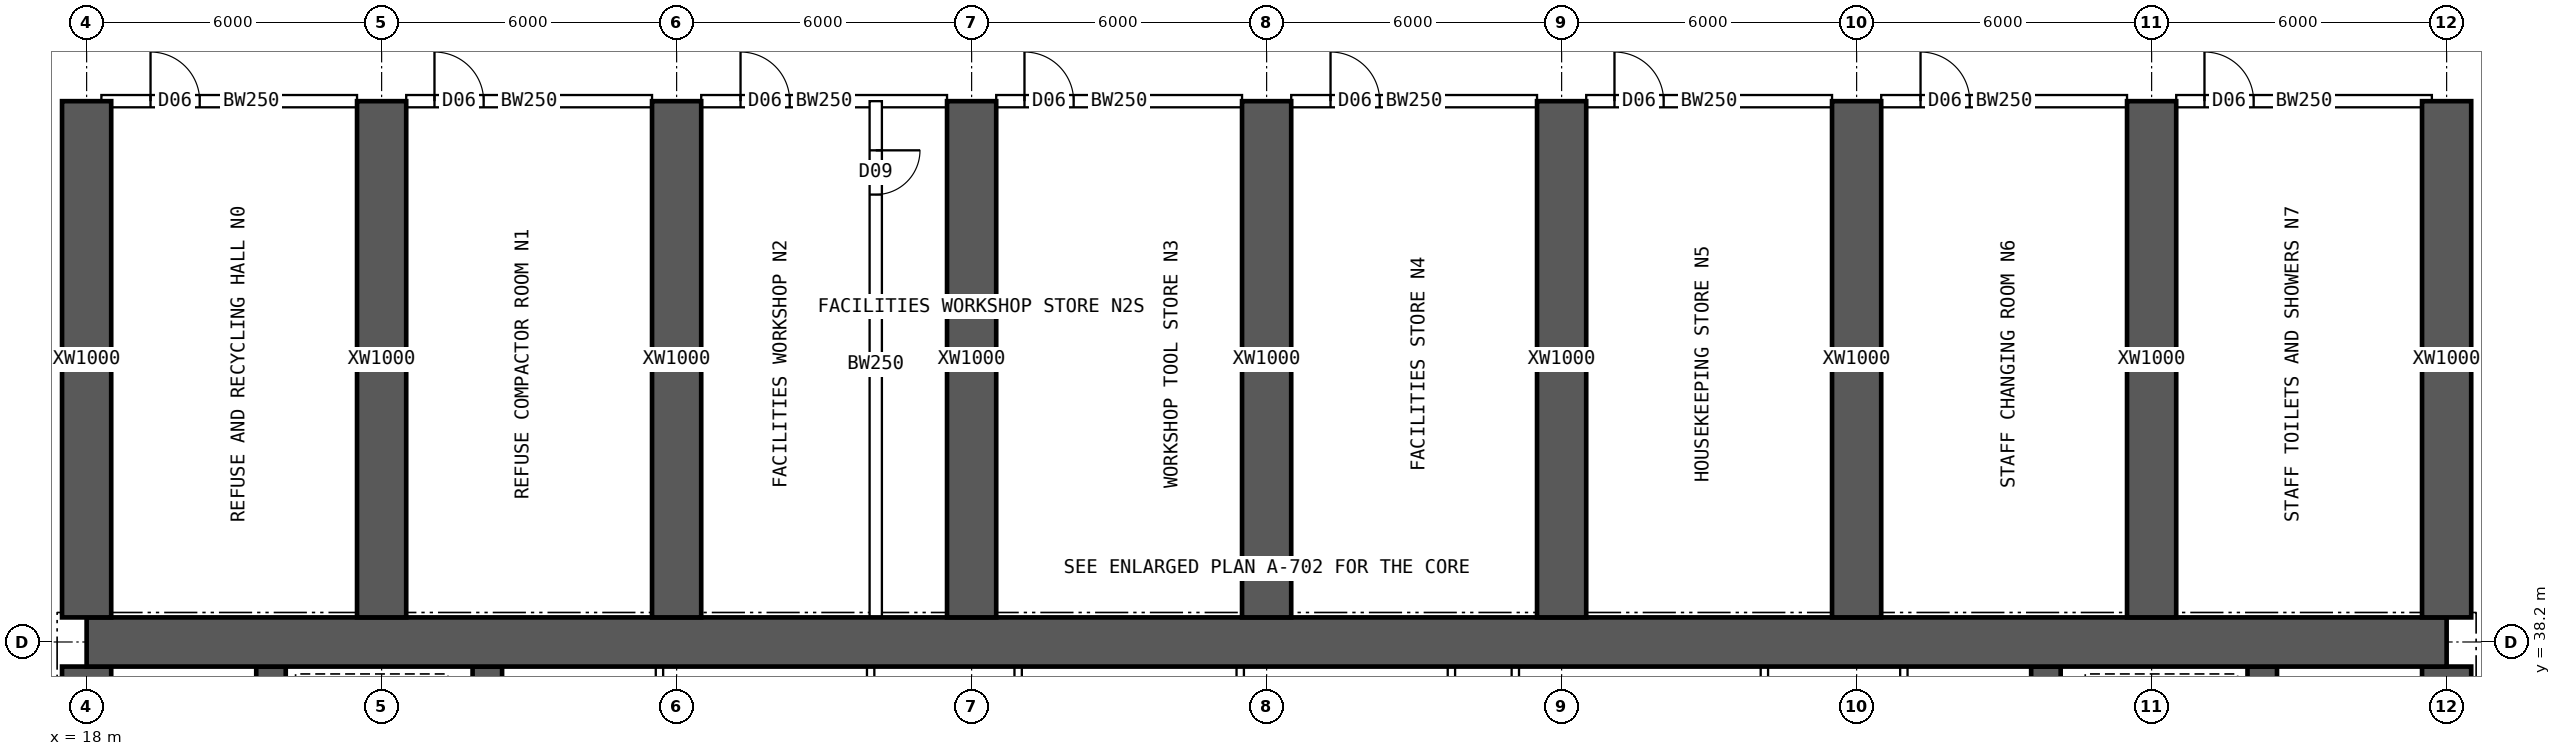
"""IFC4 building model, lengths in metres.
Left out: names, types, materials, properties, quantities, classifications, styles, units other than length and angle.
Written with IfcOpenShell. Run it as: python <this file> out.ifc"""

import sys

from ifc_helpers import new_model, si_unit, direction, frame, frame_2d, origin, place, context, subcontext, project, spatial, rectangle, extrude, element, fill, save


model = new_model("IFC4")
c1 = context("Model", 3, precision=1e-05, world=origin(), true_north=direction((0.0, 1.0)))
c2 = subcontext(c1, "Body", "Model", "MODEL_VIEW")
j1 = project(units=[si_unit("LENGTHUNIT", "METRE"), si_unit("PLANEANGLEUNIT", "RADIAN")], contexts=[c1])
p1 = place(None, origin())
s1 = spatial("IfcSite", under=j1, at=p1, CompositionType="ELEMENT")
p2 = place(p1, origin())
s2 = spatial("IfcBuilding", under=s1, at=p2, CompositionType="ELEMENT")
p3 = place(p2, frame((0.0, 0.0, -4.5)))
s3 = spatial("IfcBuildingStorey", under=s2, at=p3, CompositionType="ELEMENT", Elevation=-4.5)
p4 = place(p3, frame((18.0, 38.2, 0.0), z_axis=(0.0, 0.0, 1.0), x_axis=(1.0, 0.0, 0.0)))
e1 = element("IfcWall", 1, at=p4, inside=s3, PredefinedType="SHEAR", context=c2, shape_type="SweptSolid", body=[
    extrude(rectangle(XDim=48.0, YDim=1.0, at=frame_2d((24.0, 0.0))), origin(), (0.0, 0.0, 1.0), 4.5),
])
p5 = place(p3, frame((18.0, 26.3, 0.0), z_axis=(0.0, 0.0, 1.0), x_axis=(0.0, 1.0, 0.0)))
e2 = element("IfcWall", 2, at=p5, inside=s3, PredefinedType="SHEAR", context=c2, shape_type="SweptSolid", body=[
    extrude(rectangle(XDim=11.4, YDim=1.0, at=frame_2d((5.7, 0.0))), origin(), (0.0, 0.0, 1.0), 4.5),
])
p6 = place(p5, frame((5.0, 0.0, 0.0)))
e3 = element("IfcOpeningElement", 3, at=p6, cuts=e2, PredefinedType="OPENING", context=c2, shape_type="SweptSolid", body=[
    extrude(rectangle(XDim=1.2, YDim=2.1, at=frame_2d((0.6, 1.05))), frame((0.0, 0.51, 0.0), z_axis=(0.0, -1.0, 0.0), x_axis=(1.0, 0.0, 0.0)), (0.0, 0.0, 1.0), 1.02),
])
p7 = place(p3, frame((66.0, 26.3, 0.0), z_axis=(0.0, 0.0, 1.0), x_axis=(0.0, 1.0, 0.0)))
e4 = element("IfcWall", 4, at=p7, inside=s3, PredefinedType="SHEAR", context=c2, shape_type="SweptSolid", body=[
    extrude(rectangle(XDim=11.4, YDim=1.0, at=frame_2d((5.7, 0.0))), origin(), (0.0, 0.0, 1.0), 4.5),
])
p8 = place(p7, frame((5.0, 0.0, 0.0)))
e5 = element("IfcOpeningElement", 5, at=p8, cuts=e4, PredefinedType="OPENING", context=c2, shape_type="SweptSolid", body=[
    extrude(rectangle(XDim=1.2, YDim=2.1, at=frame_2d((0.6, 1.05))), frame((0.0, 0.51, 0.0), z_axis=(0.0, -1.0, 0.0), x_axis=(1.0, 0.0, 0.0)), (0.0, 0.0, 1.0), 1.02),
])
for number, where, z_axis, x_axis in (
    (6, (21.75, 34.75, 0.0), (0.0, 0.0, 1.0), (0.0, 1.0, 0.0)),
    (7, (62.25, 34.75, 0.0), (0.0, 0.0, 1.0), (0.0, 1.0, 0.0)),
    (8, (26.15, 34.75, 0.0), (0.0, 0.0, 1.0), (0.0, 1.0, 0.0)),
    (9, (57.85, 34.75, 0.0), (0.0, 0.0, 1.0), (0.0, 1.0, 0.0)),
):
    element("IfcWall", number, at=place(p3, frame(where, z_axis=z_axis, x_axis=x_axis)), inside=s3, PredefinedType="SHEAR", context=c2, shape_type="SweptSolid", body=[
        extrude(rectangle(XDim=2.95, YDim=0.6, at=frame_2d((1.475, 0.0))), origin(), (0.0, 0.0, 1.0), 4.5),
    ])
for number, where, z_axis, x_axis in (
    (10, (18.0, 38.7, 0.0), (0.0, 0.0, 1.0), (0.0, 1.0, 0.0)),
    (11, (24.0, 38.7, 0.0), (0.0, 0.0, 1.0), (0.0, 1.0, 0.0)),
    (12, (30.0, 38.7, 0.0), (0.0, 0.0, 1.0), (0.0, 1.0, 0.0)),
    (13, (36.0, 38.7, 0.0), (0.0, 0.0, 1.0), (0.0, 1.0, 0.0)),
    (14, (42.0, 38.7, 0.0), (0.0, 0.0, 1.0), (0.0, 1.0, 0.0)),
    (15, (48.0, 38.7, 0.0), (0.0, 0.0, 1.0), (0.0, 1.0, 0.0)),
    (16, (54.0, 38.7, 0.0), (0.0, 0.0, 1.0), (0.0, 1.0, 0.0)),
    (17, (60.0, 38.7, 0.0), (0.0, 0.0, 1.0), (0.0, 1.0, 0.0)),
    (18, (66.0, 38.7, 0.0), (0.0, 0.0, 1.0), (0.0, 1.0, 0.0)),
):
    element("IfcWall", number, at=place(p3, frame(where, z_axis=z_axis, x_axis=x_axis)), inside=s3, PredefinedType="SHEAR", context=c2, shape_type="SweptSolid", body=[
        extrude(rectangle(XDim=10.5, YDim=1.0, at=frame_2d((5.25, 0.0))), origin(), (0.0, 0.0, 1.0), 4.5),
    ])
for number, where, z_axis, x_axis in (
    (19, (29.651, 34.75, 0.0), (0.0, 0.0, 1.0), (0.0, 1.0, 0.0)),
    (20, (33.946, 34.75, 0.0), (0.0, 0.0, 1.0), (0.0, 1.0, 0.0)),
    (21, (36.946, 34.75, 0.0), (0.0, 0.0, 1.0), (0.0, 1.0, 0.0)),
    (22, (41.463, 34.75, 0.0), (0.0, 0.0, 1.0), (0.0, 1.0, 0.0)),
    (23, (45.758, 34.75, 0.0), (0.0, 0.0, 1.0), (0.0, 1.0, 0.0)),
    (24, (47.058, 34.75, 0.0), (0.0, 0.0, 1.0), (0.0, 1.0, 0.0)),
    (25, (52.124, 34.75, 0.0), (0.0, 0.0, 1.0), (0.0, 1.0, 0.0)),
    (26, (54.961, 34.75, 0.0), (0.0, 0.0, 1.0), (0.0, 1.0, 0.0)),
):
    element("IfcWall", number, at=place(p3, frame(where, z_axis=z_axis, x_axis=x_axis)), inside=s3, PredefinedType="SOLIDWALL", context=c2, shape_type="SweptSolid", body=[
        extrude(rectangle(XDim=2.95, YDim=0.15, at=frame_2d((1.475, 0.0))), origin(), (0.0, 0.0, 1.0), 4.15),
    ])
p9 = place(p3, frame((34.05, 38.5, 0.0), z_axis=(0.0, 0.0, 1.0), x_axis=(0.0, 1.0, 0.0)))
e27 = element("IfcWall", 27, at=p9, inside=s3, PredefinedType="SOLIDWALL", context=c2, shape_type="SweptSolid", body=[
    extrude(rectangle(XDim=10.7, YDim=0.25, at=frame_2d((5.35, 0.0))), origin(), (0.0, 0.0, 1.0), 4.15),
])
p10 = place(p9, frame((8.8, 0.0, 0.0)))
e28 = element("IfcOpeningElement", 28, at=p10, cuts=e27, PredefinedType="OPENING", context=c2, shape_type="SweptSolid", body=[
    extrude(rectangle(XDim=0.9, YDim=2.1, at=frame_2d((0.45, 1.05))), frame((0.0, 0.135, 0.0), z_axis=(0.0, -1.0, 0.0), x_axis=(1.0, 0.0, 0.0)), (0.0, 0.0, 1.0), 0.27),
])
p11 = place(p3, frame((18.3, 49.2, 0.0), z_axis=(0.0, 0.0, 1.0), x_axis=(1.0, 0.0, 0.0)))
e29 = element("IfcWall", 29, at=p11, inside=s3, PredefinedType="SOLIDWALL", context=c2, shape_type="SweptSolid", body=[
    extrude(rectangle(XDim=5.2, YDim=0.25, at=frame_2d((2.6, 0.0))), origin(), (0.0, 0.0, 1.0), 4.15),
])
p12 = place(p11, frame((1.0, 0.0, 0.0)))
e30 = element("IfcOpeningElement", 30, at=p12, cuts=e29, PredefinedType="OPENING", context=c2, shape_type="SweptSolid", body=[
    extrude(rectangle(XDim=1.0, YDim=2.1, at=frame_2d((0.5, 1.05))), frame((0.0, 0.135, 0.0), z_axis=(0.0, -1.0, 0.0), x_axis=(1.0, 0.0, 0.0)), (0.0, 0.0, 1.0), 0.27),
])
p13 = place(p3, frame((24.5, 49.2, 0.0), z_axis=(0.0, 0.0, 1.0), x_axis=(1.0, 0.0, 0.0)))
e31 = element("IfcWall", 31, at=p13, inside=s3, PredefinedType="SOLIDWALL", context=c2, shape_type="SweptSolid", body=[
    extrude(rectangle(XDim=5.0, YDim=0.25, at=frame_2d((2.5, 0.0))), origin(), (0.0, 0.0, 1.0), 4.15),
])
p14 = place(p13, frame((0.575, 0.0, 0.0)))
e32 = element("IfcOpeningElement", 32, at=p14, cuts=e31, PredefinedType="OPENING", context=c2, shape_type="SweptSolid", body=[
    extrude(rectangle(XDim=1.0, YDim=2.1, at=frame_2d((0.5, 1.05))), frame((0.0, 0.135, 0.0), z_axis=(0.0, -1.0, 0.0), x_axis=(1.0, 0.0, 0.0)), (0.0, 0.0, 1.0), 0.27),
])
p15 = place(p3, frame((30.5, 49.2, 0.0), z_axis=(0.0, 0.0, 1.0), x_axis=(1.0, 0.0, 0.0)))
e33 = element("IfcWall", 33, at=p15, inside=s3, PredefinedType="SOLIDWALL", context=c2, shape_type="SweptSolid", body=[
    extrude(rectangle(XDim=5.0, YDim=0.25, at=frame_2d((2.5, 0.0))), origin(), (0.0, 0.0, 1.0), 4.15),
])
p16 = place(p15, frame((0.8, 0.0, 0.0)))
e34 = element("IfcOpeningElement", 34, at=p16, cuts=e33, PredefinedType="OPENING", context=c2, shape_type="SweptSolid", body=[
    extrude(rectangle(XDim=1.0, YDim=2.1, at=frame_2d((0.5, 1.05))), frame((0.0, 0.135, 0.0), z_axis=(0.0, -1.0, 0.0), x_axis=(1.0, 0.0, 0.0)), (0.0, 0.0, 1.0), 0.27),
])
p17 = place(p3, frame((36.5, 49.2, 0.0), z_axis=(0.0, 0.0, 1.0), x_axis=(1.0, 0.0, 0.0)))
e35 = element("IfcWall", 35, at=p17, inside=s3, PredefinedType="SOLIDWALL", context=c2, shape_type="SweptSolid", body=[
    extrude(rectangle(XDim=5.0, YDim=0.25, at=frame_2d((2.5, 0.0))), origin(), (0.0, 0.0, 1.0), 4.15),
])
p18 = place(p17, frame((0.575, 0.0, 0.0)))
e36 = element("IfcOpeningElement", 36, at=p18, cuts=e35, PredefinedType="OPENING", context=c2, shape_type="SweptSolid", body=[
    extrude(rectangle(XDim=1.0, YDim=2.1, at=frame_2d((0.5, 1.05))), frame((0.0, 0.135, 0.0), z_axis=(0.0, -1.0, 0.0), x_axis=(1.0, 0.0, 0.0)), (0.0, 0.0, 1.0), 0.27),
])
p19 = place(p3, frame((42.5, 49.2, 0.0), z_axis=(0.0, 0.0, 1.0), x_axis=(1.0, 0.0, 0.0)))
e37 = element("IfcWall", 37, at=p19, inside=s3, PredefinedType="SOLIDWALL", context=c2, shape_type="SweptSolid", body=[
    extrude(rectangle(XDim=5.0, YDim=0.25, at=frame_2d((2.5, 0.0))), origin(), (0.0, 0.0, 1.0), 4.15),
])
p20 = place(p19, frame((0.8, 0.0, 0.0)))
e38 = element("IfcOpeningElement", 38, at=p20, cuts=e37, PredefinedType="OPENING", context=c2, shape_type="SweptSolid", body=[
    extrude(rectangle(XDim=1.0, YDim=2.1, at=frame_2d((0.5, 1.05))), frame((0.0, 0.135, 0.0), z_axis=(0.0, -1.0, 0.0), x_axis=(1.0, 0.0, 0.0)), (0.0, 0.0, 1.0), 0.27),
])
p21 = place(p3, frame((48.5, 49.2, 0.0), z_axis=(0.0, 0.0, 1.0), x_axis=(1.0, 0.0, 0.0)))
e39 = element("IfcWall", 39, at=p21, inside=s3, PredefinedType="SOLIDWALL", context=c2, shape_type="SweptSolid", body=[
    extrude(rectangle(XDim=5.0, YDim=0.25, at=frame_2d((2.5, 0.0))), origin(), (0.0, 0.0, 1.0), 4.15),
])
p22 = place(p21, frame((0.575, 0.0, 0.0)))
e40 = element("IfcOpeningElement", 40, at=p22, cuts=e39, PredefinedType="OPENING", context=c2, shape_type="SweptSolid", body=[
    extrude(rectangle(XDim=1.0, YDim=2.1, at=frame_2d((0.5, 1.05))), frame((0.0, 0.135, 0.0), z_axis=(0.0, -1.0, 0.0), x_axis=(1.0, 0.0, 0.0)), (0.0, 0.0, 1.0), 0.27),
])
p23 = place(p3, frame((54.5, 49.2, 0.0), z_axis=(0.0, 0.0, 1.0), x_axis=(1.0, 0.0, 0.0)))
e41 = element("IfcWall", 41, at=p23, inside=s3, PredefinedType="SOLIDWALL", context=c2, shape_type="SweptSolid", body=[
    extrude(rectangle(XDim=5.0, YDim=0.25, at=frame_2d((2.5, 0.0))), origin(), (0.0, 0.0, 1.0), 4.15),
])
p24 = place(p23, frame((0.8, 0.0, 0.0)))
e42 = element("IfcOpeningElement", 42, at=p24, cuts=e41, PredefinedType="OPENING", context=c2, shape_type="SweptSolid", body=[
    extrude(rectangle(XDim=1.0, YDim=2.1, at=frame_2d((0.5, 1.05))), frame((0.0, 0.135, 0.0), z_axis=(0.0, -1.0, 0.0), x_axis=(1.0, 0.0, 0.0)), (0.0, 0.0, 1.0), 0.27),
])
p25 = place(p3, frame((60.5, 49.2, 0.0), z_axis=(0.0, 0.0, 1.0), x_axis=(1.0, 0.0, 0.0)))
e43 = element("IfcWall", 43, at=p25, inside=s3, PredefinedType="SOLIDWALL", context=c2, shape_type="SweptSolid", body=[
    extrude(rectangle(XDim=5.2, YDim=0.25, at=frame_2d((2.6, 0.0))), origin(), (0.0, 0.0, 1.0), 4.15),
])
p26 = place(p25, frame((0.575, 0.0, 0.0)))
e44 = element("IfcOpeningElement", 44, at=p26, cuts=e43, PredefinedType="OPENING", context=c2, shape_type="SweptSolid", body=[
    extrude(rectangle(XDim=1.0, YDim=2.1, at=frame_2d((0.5, 1.05))), frame((0.0, 0.135, 0.0), z_axis=(0.0, -1.0, 0.0), x_axis=(1.0, 0.0, 0.0)), (0.0, 0.0, 1.0), 0.27),
])
p27 = place(p10, origin())
e45 = element("IfcDoor", 45, at=p27, inside=s3, OperationType="SINGLE_SWING_RIGHT", PredefinedType="DOOR", context=c2, shape_type="SweptSolid", body=[
    extrude(rectangle(XDim=0.9, YDim=2.1, at=frame_2d((0.45, 1.05))), frame((0.0, 0.025, 0.0), z_axis=(0.0, -1.0, 0.0), x_axis=(1.0, 0.0, 0.0)), (0.0, 0.0, 1.0), 0.05),
])
fill(e28, e45)
p28 = place(p12, origin())
e46 = element("IfcDoor", 46, at=p28, inside=s3, OperationType="SINGLE_SWING_LEFT", PredefinedType="DOOR", context=c2, shape_type="SweptSolid", body=[
    extrude(rectangle(XDim=1.0, YDim=2.1, at=frame_2d((0.5, 1.05))), frame((0.0, 0.025, 0.0), z_axis=(0.0, -1.0, 0.0), x_axis=(1.0, 0.0, 0.0)), (0.0, 0.0, 1.0), 0.05),
])
fill(e30, e46)
p29 = place(p14, origin())
e47 = element("IfcDoor", 47, at=p29, inside=s3, OperationType="SINGLE_SWING_LEFT", PredefinedType="DOOR", context=c2, shape_type="SweptSolid", body=[
    extrude(rectangle(XDim=1.0, YDim=2.1, at=frame_2d((0.5, 1.05))), frame((0.0, 0.025, 0.0), z_axis=(0.0, -1.0, 0.0), x_axis=(1.0, 0.0, 0.0)), (0.0, 0.0, 1.0), 0.05),
])
fill(e32, e47)
p30 = place(p16, origin())
e48 = element("IfcDoor", 48, at=p30, inside=s3, OperationType="SINGLE_SWING_LEFT", PredefinedType="DOOR", context=c2, shape_type="SweptSolid", body=[
    extrude(rectangle(XDim=1.0, YDim=2.1, at=frame_2d((0.5, 1.05))), frame((0.0, 0.025, 0.0), z_axis=(0.0, -1.0, 0.0), x_axis=(1.0, 0.0, 0.0)), (0.0, 0.0, 1.0), 0.05),
])
fill(e34, e48)
p31 = place(p18, origin())
e49 = element("IfcDoor", 49, at=p31, inside=s3, OperationType="SINGLE_SWING_LEFT", PredefinedType="DOOR", context=c2, shape_type="SweptSolid", body=[
    extrude(rectangle(XDim=1.0, YDim=2.1, at=frame_2d((0.5, 1.05))), frame((0.0, 0.025, 0.0), z_axis=(0.0, -1.0, 0.0), x_axis=(1.0, 0.0, 0.0)), (0.0, 0.0, 1.0), 0.05),
])
fill(e36, e49)
p32 = place(p20, origin())
e50 = element("IfcDoor", 50, at=p32, inside=s3, OperationType="SINGLE_SWING_LEFT", PredefinedType="DOOR", context=c2, shape_type="SweptSolid", body=[
    extrude(rectangle(XDim=1.0, YDim=2.1, at=frame_2d((0.5, 1.05))), frame((0.0, 0.025, 0.0), z_axis=(0.0, -1.0, 0.0), x_axis=(1.0, 0.0, 0.0)), (0.0, 0.0, 1.0), 0.05),
])
fill(e38, e50)
p33 = place(p22, origin())
e51 = element("IfcDoor", 51, at=p33, inside=s3, OperationType="SINGLE_SWING_LEFT", PredefinedType="DOOR", context=c2, shape_type="SweptSolid", body=[
    extrude(rectangle(XDim=1.0, YDim=2.1, at=frame_2d((0.5, 1.05))), frame((0.0, 0.025, 0.0), z_axis=(0.0, -1.0, 0.0), x_axis=(1.0, 0.0, 0.0)), (0.0, 0.0, 1.0), 0.05),
])
fill(e40, e51)
p34 = place(p24, origin())
e52 = element("IfcDoor", 52, at=p34, inside=s3, OperationType="SINGLE_SWING_LEFT", PredefinedType="DOOR", context=c2, shape_type="SweptSolid", body=[
    extrude(rectangle(XDim=1.0, YDim=2.1, at=frame_2d((0.5, 1.05))), frame((0.0, 0.025, 0.0), z_axis=(0.0, -1.0, 0.0), x_axis=(1.0, 0.0, 0.0)), (0.0, 0.0, 1.0), 0.05),
])
fill(e42, e52)
p35 = place(p26, origin())
e53 = element("IfcDoor", 53, at=p35, inside=s3, OperationType="SINGLE_SWING_LEFT", PredefinedType="DOOR", context=c2, shape_type="SweptSolid", body=[
    extrude(rectangle(XDim=1.0, YDim=2.1, at=frame_2d((0.5, 1.05))), frame((0.0, 0.025, 0.0), z_axis=(0.0, -1.0, 0.0), x_axis=(1.0, 0.0, 0.0)), (0.0, 0.0, 1.0), 0.05),
])
fill(e44, e53)
save(model, sys.argv[1])
